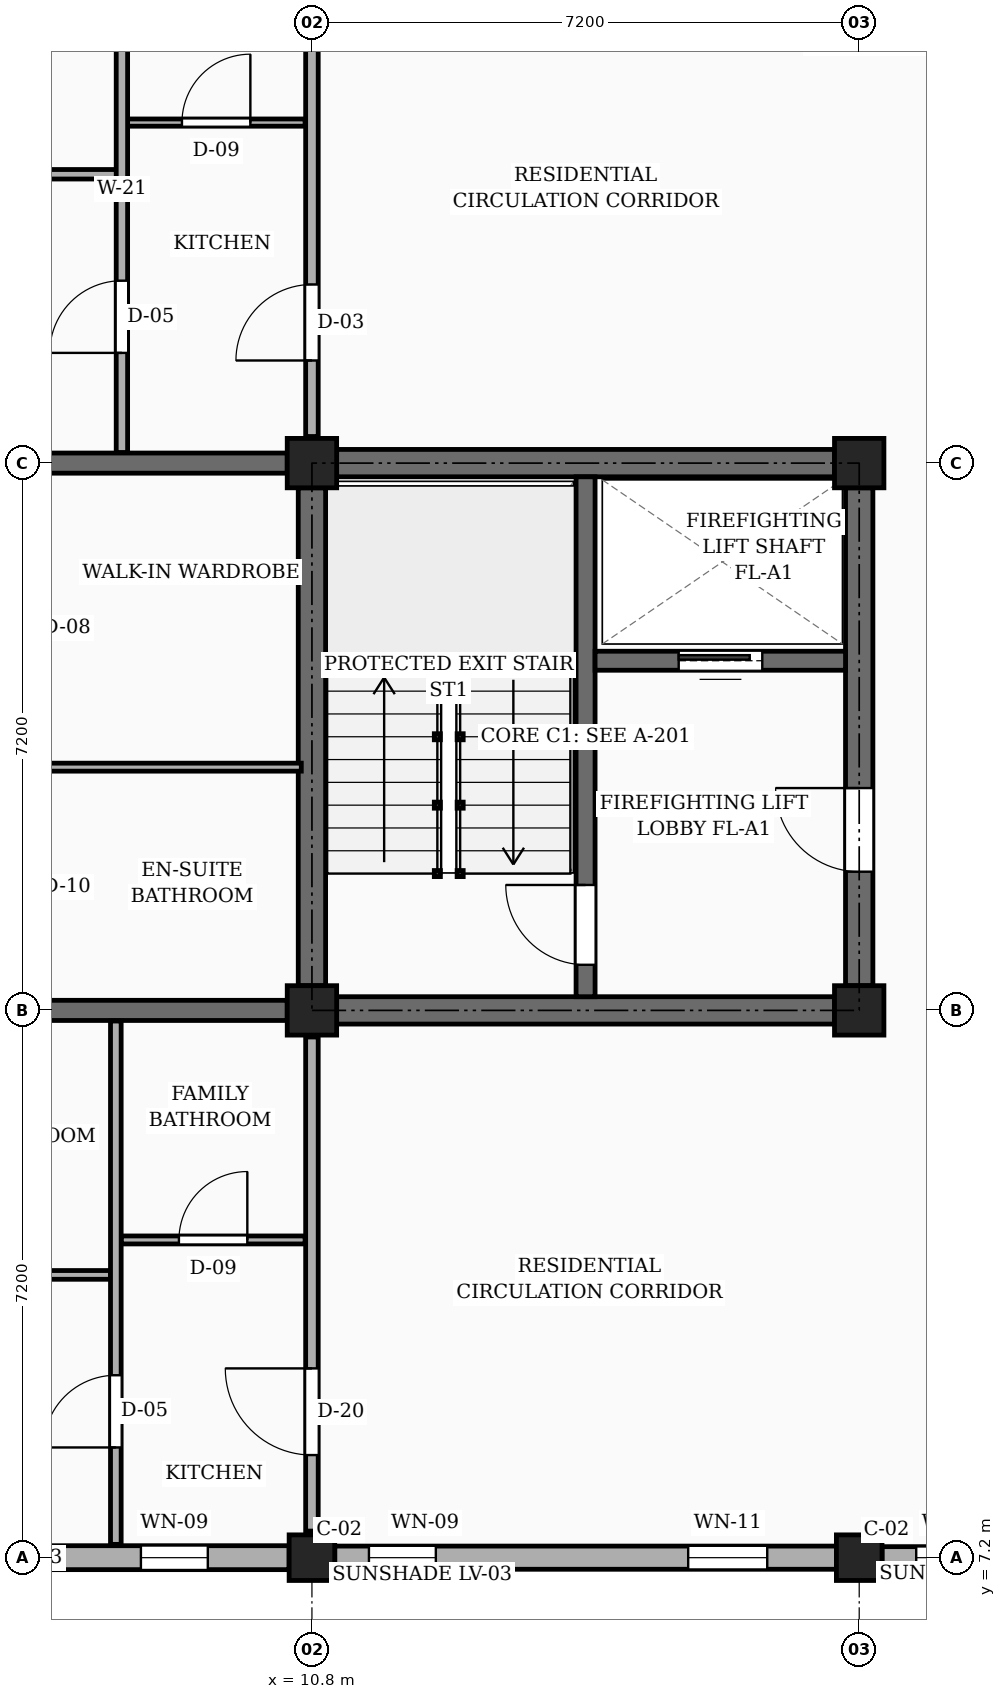
"""IFC4 building model, lengths in metres.
Left out: names, types, materials, properties, quantities, classifications, styles, units other than length and angle.
Written with IfcOpenShell. Run it as: python <this file> out.ifc"""

import sys

from ifc_helpers import new_model, si_unit, direction, frame, frame_2d, origin, origin_2d, place, context, subcontext, project, spatial, rectangle, extrude, element, fill, save


model = new_model("IFC4")
c1 = context("Model", 3, precision=1e-05, world=origin(), true_north=direction((0.0, 1.0)))
c2 = subcontext(c1, "Body", "Model", "MODEL_VIEW")
j1 = project(units=[si_unit("LENGTHUNIT", "METRE"), si_unit("PLANEANGLEUNIT", "RADIAN")], contexts=[c1])
p1 = place(None, origin())
s1 = spatial("IfcSite", under=j1, at=p1, CompositionType="ELEMENT")
p2 = place(p1, origin())
s2 = spatial("IfcBuilding", under=s1, at=p2, CompositionType="ELEMENT")
p3 = place(p2, frame((0.0, 0.0, 4.5)))
s3 = spatial("IfcBuildingStorey", under=s2, at=p3, CompositionType="ELEMENT", Elevation=4.5)
p4 = place(p3, frame((10.8, 7.2, 0.0), z_axis=(0.0, 0.0, 1.0), x_axis=(1.0, 0.0, 0.0)))
e1 = element("IfcColumn", 1, at=p4, inside=s3, PredefinedType="COLUMN", context=c2, shape_type="SweptSolid", body=[
    extrude(rectangle(XDim=0.6, YDim=0.6, at=origin_2d()), origin(), (0.0, 0.0, 1.0), 3.15),
])
for number, where, z_axis, x_axis in (
    (2, (10.8, 14.4, 0.0), (0.0, 0.0, 1.0), (1.0, 0.0, 0.0)),
    (3, (10.8, 21.6, 0.0), (0.0, 0.0, 1.0), (1.0, 0.0, 0.0)),
):
    element("IfcColumn", number, at=place(p3, frame(where, z_axis=z_axis, x_axis=x_axis)), inside=s3, PredefinedType="COLUMN", context=c2, shape_type="SweptSolid", body=[
        extrude(rectangle(XDim=0.65, YDim=0.65, at=origin_2d()), origin(), (0.0, 0.0, 1.0), 3.15),
    ])
p5 = place(p3, frame((18.0, 7.2, 0.0), z_axis=(0.0, 0.0, 1.0), x_axis=(1.0, 0.0, 0.0)))
e4 = element("IfcColumn", 4, at=p5, inside=s3, PredefinedType="COLUMN", context=c2, shape_type="SweptSolid", body=[
    extrude(rectangle(XDim=0.6, YDim=0.6, at=origin_2d()), origin(), (0.0, 0.0, 1.0), 3.15),
])
for number, where, z_axis, x_axis in (
    (5, (18.0, 14.4, 0.0), (0.0, 0.0, 1.0), (1.0, 0.0, 0.0)),
    (6, (18.0, 21.6, 0.0), (0.0, 0.0, 1.0), (1.0, 0.0, 0.0)),
):
    element("IfcColumn", number, at=place(p3, frame(where, z_axis=z_axis, x_axis=x_axis)), inside=s3, PredefinedType="COLUMN", context=c2, shape_type="SweptSolid", body=[
        extrude(rectangle(XDim=0.65, YDim=0.65, at=origin_2d()), origin(), (0.0, 0.0, 1.0), 3.15),
    ])
p6 = place(p3, frame((3.9, 14.4, 0.0), z_axis=(0.0, 0.0, 1.0), x_axis=(1.0, 0.0, 0.0)))
e7 = element("IfcWall", 7, at=p6, inside=s3, PredefinedType="SOLIDWALL", context=c2, shape_type="SweptSolid", body=[
    extrude(rectangle(XDim=6.575, YDim=0.265, at=frame_2d((3.288, 0.0))), origin(), (0.0, 0.0, 1.0), 2.17),
])
p7 = place(p6, frame((1.35, 0.0, 0.0)))
e8 = element("IfcOpeningElement", 8, at=p7, cuts=e7, PredefinedType="OPENING", context=c2, shape_type="SweptSolid", body=[
    extrude(rectangle(XDim=0.98, YDim=2.12, at=frame_2d((0.49, 1.06))), frame((0.0, 0.143, 0.0), z_axis=(0.0, -1.0, 0.0), x_axis=(1.0, 0.0, 0.0)), (0.0, 0.0, 1.0), 0.285),
])
p8 = place(p3, frame((3.9, 21.6, 0.0), z_axis=(0.0, 0.0, 1.0), x_axis=(1.0, 0.0, 0.0)))
e9 = element("IfcWall", 9, at=p8, inside=s3, PredefinedType="SOLIDWALL", context=c2, shape_type="SweptSolid", body=[
    extrude(rectangle(XDim=6.575, YDim=0.265, at=frame_2d((3.288, 0.0))), origin(), (0.0, 0.0, 1.0), 2.17),
])
p9 = place(p3, frame((3.9, 7.2, 0.0), z_axis=(0.0, 0.0, 1.0), x_axis=(1.0, 0.0, 0.0)))
e10 = element("IfcWall", 10, at=p9, inside=s3, PredefinedType="SOLIDWALL", context=c2, shape_type="SweptSolid", body=[
    extrude(rectangle(XDim=6.6, YDim=0.315, at=frame_2d((3.3, 0.0))), origin(), (0.0, 0.0, 1.0), 2.44),
])
p10 = place(p9, frame((0.45, 0.0, 0.78)))
e11 = element("IfcOpeningElement", 11, at=p10, cuts=e10, PredefinedType="OPENING", context=c2, shape_type="SweptSolid", body=[
    extrude(rectangle(XDim=1.32, YDim=1.15, at=frame_2d((0.66, 0.575))), frame((0.0, 0.167, 0.0), z_axis=(0.0, -1.0, 0.0), x_axis=(1.0, 0.0, 0.0)), (0.0, 0.0, 1.0), 0.335),
])
p11 = place(p9, frame((4.65, 0.0, 0.78)))
e12 = element("IfcOpeningElement", 12, at=p11, cuts=e10, PredefinedType="OPENING", context=c2, shape_type="SweptSolid", body=[
    extrude(rectangle(XDim=0.88, YDim=1.26, at=frame_2d((0.44, 0.63))), frame((0.0, 0.167, 0.0), z_axis=(0.0, -1.0, 0.0), x_axis=(1.0, 0.0, 0.0)), (0.0, 0.0, 1.0), 0.335),
])
p12 = place(p3, frame((11.1, 7.2, 0.0), z_axis=(0.0, 0.0, 1.0), x_axis=(1.0, 0.0, 0.0)))
e13 = element("IfcWall", 13, at=p12, inside=s3, PredefinedType="SOLIDWALL", context=c2, shape_type="SweptSolid", body=[
    extrude(rectangle(XDim=6.6, YDim=0.305, at=frame_2d((3.3, 0.0))), origin(), (0.0, 0.0, 1.0), 2.44),
])
p13 = place(p12, frame((0.45, 0.0, 0.78)))
e14 = element("IfcOpeningElement", 14, at=p13, cuts=e13, PredefinedType="OPENING", context=c2, shape_type="SweptSolid", body=[
    extrude(rectangle(XDim=0.88, YDim=1.26, at=frame_2d((0.44, 0.63))), frame((0.0, 0.163, 0.0), z_axis=(0.0, -1.0, 0.0), x_axis=(1.0, 0.0, 0.0)), (0.0, 0.0, 1.0), 0.325),
])
p14 = place(p12, frame((4.65, 0.0, 0.78)))
e15 = element("IfcOpeningElement", 15, at=p14, cuts=e13, PredefinedType="OPENING", context=c2, shape_type="SweptSolid", body=[
    extrude(rectangle(XDim=1.04, YDim=1.26, at=frame_2d((0.52, 0.63))), frame((0.0, 0.163, 0.0), z_axis=(0.0, -1.0, 0.0), x_axis=(1.0, 0.0, 0.0)), (0.0, 0.0, 1.0), 0.325),
])
p15 = place(p3, frame((18.3, 7.2, 0.0), z_axis=(0.0, 0.0, 1.0), x_axis=(1.0, 0.0, 0.0)))
e16 = element("IfcWall", 16, at=p15, inside=s3, PredefinedType="SOLIDWALL", context=c2, shape_type="SweptSolid", body=[
    extrude(rectangle(XDim=6.6, YDim=0.29, at=frame_2d((3.3, 0.0))), origin(), (0.0, 0.0, 1.0), 2.44),
])
p16 = place(p15, frame((0.45, 0.0, 0.78)))
e17 = element("IfcOpeningElement", 17, at=p16, cuts=e16, PredefinedType="OPENING", context=c2, shape_type="SweptSolid", body=[
    extrude(rectangle(XDim=1.04, YDim=1.26, at=frame_2d((0.52, 0.63))), frame((0.0, 0.155, 0.0), z_axis=(0.0, -1.0, 0.0), x_axis=(1.0, 0.0, 0.0)), (0.0, 0.0, 1.0), 0.31),
])
p17 = place(p15, frame((2.675, 0.0, 0.78)))
e18 = element("IfcOpeningElement", 18, at=p17, cuts=e16, PredefinedType="OPENING", context=c2, shape_type="SweptSolid", body=[
    extrude(rectangle(XDim=1.2, YDim=1.26, at=frame_2d((0.6, 0.63))), frame((0.0, 0.155, 0.0), z_axis=(0.0, -1.0, 0.0), x_axis=(1.0, 0.0, 0.0)), (0.0, 0.0, 1.0), 0.31),
])
p18 = place(p15, frame((5.085, 0.0, 0.78)))
e19 = element("IfcOpeningElement", 19, at=p18, cuts=e16, PredefinedType="OPENING", context=c2, shape_type="SweptSolid", body=[
    extrude(rectangle(XDim=1.04, YDim=1.26, at=frame_2d((0.52, 0.63))), frame((0.0, 0.155, 0.0), z_axis=(0.0, -1.0, 0.0), x_axis=(1.0, 0.0, 0.0)), (0.0, 0.0, 1.0), 0.31),
])
p19 = place(p3, frame((10.8, 14.725, 0.0), z_axis=(0.0, 0.0, 1.0), x_axis=(0.0, 1.0, 0.0)))
e20 = element("IfcWall", 20, at=p19, inside=s3, PredefinedType="SHEAR", context=c2, shape_type="SweptSolid", body=[
    extrude(rectangle(XDim=6.55, YDim=0.36, at=frame_2d((3.275, 0.0))), origin(), (0.0, 0.0, 1.0), 2.87),
])
p20 = place(p3, frame((11.125, 21.6, 0.0), z_axis=(0.0, 0.0, 1.0), x_axis=(1.0, 0.0, 0.0)))
e21 = element("IfcWall", 21, at=p20, inside=s3, PredefinedType="SHEAR", context=c2, shape_type="SweptSolid", body=[
    extrude(rectangle(XDim=6.55, YDim=0.36, at=frame_2d((3.275, 0.0))), origin(), (0.0, 0.0, 1.0), 2.87),
])
p21 = place(p3, frame((18.0, 14.725, 0.0), z_axis=(0.0, 0.0, 1.0), x_axis=(0.0, 1.0, 0.0)))
e22 = element("IfcWall", 22, at=p21, inside=s3, PredefinedType="SHEAR", context=c2, shape_type="SweptSolid", body=[
    extrude(rectangle(XDim=6.55, YDim=0.36, at=frame_2d((3.275, 0.0))), origin(), (0.0, 0.0, 1.0), 2.87),
])
p22 = place(p21, frame((1.5, 0.0, 0.0)))
e23 = element("IfcOpeningElement", 23, at=p22, cuts=e22, PredefinedType="OPENING", context=c2, shape_type="SweptSolid", body=[
    extrude(rectangle(XDim=1.1, YDim=2.15, at=frame_2d((0.55, 1.075))), frame((0.0, 0.19, 0.0), z_axis=(0.0, -1.0, 0.0), x_axis=(1.0, 0.0, 0.0)), (0.0, 0.0, 1.0), 0.38),
])
p23 = place(p3, frame((11.125, 14.4, 0.0), z_axis=(0.0, 0.0, 1.0), x_axis=(1.0, 0.0, 0.0)))
e24 = element("IfcWall", 24, at=p23, inside=s3, PredefinedType="SHEAR", context=c2, shape_type="SweptSolid", body=[
    extrude(rectangle(XDim=6.55, YDim=0.36, at=frame_2d((3.275, 0.0))), origin(), (0.0, 0.0, 1.0), 2.87),
])
p24 = place(p3, frame((14.4, 14.58, 0.0), z_axis=(0.0, 0.0, 1.0), x_axis=(0.0, 1.0, 0.0)))
e25 = element("IfcWall", 25, at=p24, inside=s3, PredefinedType="SHEAR", context=c2, shape_type="SweptSolid", body=[
    extrude(rectangle(XDim=6.84, YDim=0.25, at=frame_2d((3.42, 0.0))), origin(), (0.0, 0.0, 1.0), 2.87),
])
p25 = place(p24, frame((0.42, 0.0, 0.0)))
e26 = element("IfcOpeningElement", 26, at=p25, cuts=e25, PredefinedType="OPENING", context=c2, shape_type="SweptSolid", body=[
    extrude(rectangle(XDim=1.05, YDim=2.15, at=frame_2d((0.525, 1.075))), frame((0.0, 0.135, 0.0), z_axis=(0.0, -1.0, 0.0), x_axis=(1.0, 0.0, 0.0)), (0.0, 0.0, 1.0), 0.27),
])
p26 = place(p3, frame((14.525, 19.0, 0.0), z_axis=(0.0, 0.0, 1.0), x_axis=(1.0, 0.0, 0.0)))
e27 = element("IfcWall", 27, at=p26, inside=s3, PredefinedType="SHEAR", context=c2, shape_type="SweptSolid", body=[
    extrude(rectangle(XDim=3.295, YDim=0.25, at=frame_2d((1.647, 0.0))), origin(), (0.0, 0.0, 1.0), 2.87),
])
p27 = place(p26, frame((1.1, 0.0, 0.0)))
e28 = element("IfcOpeningElement", 28, at=p27, cuts=e27, PredefinedType="OPENING", context=c2, shape_type="SweptSolid", body=[
    extrude(rectangle(XDim=1.1, YDim=2.2, at=frame_2d((0.55, 1.1))), frame((0.0, 0.135, 0.0), z_axis=(0.0, -1.0, 0.0), x_axis=(1.0, 0.0, 0.0)), (0.0, 0.0, 1.0), 0.27),
])
p28 = place(p3, frame((10.8, 7.55, 0.0), z_axis=(0.0, 0.0, 1.0), x_axis=(0.0, 1.0, 0.0)))
e29 = element("IfcWall", 29, at=p28, inside=s3, PredefinedType="PARTITIONING", context=c2, shape_type="SweptSolid", body=[
    extrude(rectangle(XDim=6.5, YDim=0.165, at=frame_2d((3.25, 0.0))), origin(), (0.0, 0.0, 1.0), 2.22),
])
p29 = place(p28, frame((1.0, 0.0, 0.0)))
e30 = element("IfcOpeningElement", 30, at=p29, cuts=e29, PredefinedType="OPENING", context=c2, shape_type="SweptSolid", body=[
    extrude(rectangle(XDim=1.14, YDim=2.18, at=frame_2d((0.57, 1.09))), frame((0.0, 0.093, 0.0), z_axis=(0.0, -1.0, 0.0), x_axis=(1.0, 0.0, 0.0)), (0.0, 0.0, 1.0), 0.185),
])
p30 = place(p3, frame((10.8, 21.95, 0.0), z_axis=(0.0, 0.0, 1.0), x_axis=(0.0, 1.0, 0.0)))
e31 = element("IfcWall", 31, at=p30, inside=s3, PredefinedType="PARTITIONING", context=c2, shape_type="SweptSolid", body=[
    extrude(rectangle(XDim=6.5, YDim=0.165, at=frame_2d((3.25, 0.0))), origin(), (0.0, 0.0, 1.0), 2.22),
])
p31 = place(p30, frame((1.0, 0.0, 0.0)))
e32 = element("IfcOpeningElement", 32, at=p31, cuts=e31, PredefinedType="OPENING", context=c2, shape_type="SweptSolid", body=[
    extrude(rectangle(XDim=1.0, YDim=2.15, at=frame_2d((0.5, 1.075))), frame((0.0, 0.093, 0.0), z_axis=(0.0, -1.0, 0.0), x_axis=(1.0, 0.0, 0.0)), (0.0, 0.0, 1.0), 0.185),
])
p32 = place(p3, frame((3.775, 10.92, 0.0), z_axis=(0.0, 0.0, 1.0), x_axis=(1.0, 0.0, 0.0)))
e33 = element("IfcWall", 33, at=p32, inside=s3, PredefinedType="PARTITIONING", context=c2, shape_type="SweptSolid", body=[
    extrude(rectangle(XDim=4.375, YDim=0.115, at=frame_2d((2.188, 0.0))), origin(), (0.0, 0.0, 1.0), 2.305),
])
p33 = place(p32, frame((1.738, 0.0, 0.0)))
e34 = element("IfcOpeningElement", 34, at=p33, cuts=e33, PredefinedType="OPENING", context=c2, shape_type="SweptSolid", body=[
    extrude(rectangle(XDim=0.9, YDim=2.1, at=frame_2d((0.45, 1.05))), frame((0.0, 0.067, 0.0), z_axis=(0.0, -1.0, 0.0), x_axis=(1.0, 0.0, 0.0)), (0.0, 0.0, 1.0), 0.135),
])
p34 = place(p3, frame((8.29, 11.38, 0.0), z_axis=(0.0, 0.0, 1.0), x_axis=(1.0, 0.0, 0.0)))
e35 = element("IfcWall", 35, at=p34, inside=s3, PredefinedType="PARTITIONING", context=c2, shape_type="SweptSolid", body=[
    extrude(rectangle(XDim=2.42, YDim=0.105, at=frame_2d((1.21, 0.0))), origin(), (0.0, 0.0, 1.0), 2.305),
])
p35 = place(p34, frame((0.76, 0.0, 0.0)))
e36 = element("IfcOpeningElement", 36, at=p35, cuts=e35, PredefinedType="OPENING", context=c2, shape_type="SweptSolid", body=[
    extrude(rectangle(XDim=0.9, YDim=2.05, at=frame_2d((0.45, 1.025))), frame((0.0, 0.062, 0.0), z_axis=(0.0, -1.0, 0.0), x_axis=(1.0, 0.0, 0.0)), (0.0, 0.0, 1.0), 0.125),
])
p36 = place(p3, frame((8.22, 7.375, 0.0), z_axis=(0.0, 0.0, 1.0), x_axis=(0.0, 1.0, 0.0)))
e37 = element("IfcWall", 37, at=p36, inside=s3, PredefinedType="PARTITIONING", context=c2, shape_type="SweptSolid", body=[
    extrude(rectangle(XDim=6.885, YDim=0.14, at=frame_2d((3.442, 0.0))), origin(), (0.0, 0.0, 1.0), 2.305),
])
p37 = place(p36, frame((1.275, 0.0, 0.0)))
e38 = element("IfcOpeningElement", 38, at=p37, cuts=e37, PredefinedType="OPENING", context=c2, shape_type="SweptSolid", body=[
    extrude(rectangle(XDim=0.95, YDim=2.1, at=frame_2d((0.475, 1.05))), frame((0.0, 0.08, 0.0), z_axis=(0.0, -1.0, 0.0), x_axis=(1.0, 0.0, 0.0)), (0.0, 0.0, 1.0), 0.16),
])
p38 = place(p3, frame((7.27, 17.6, 0.0), z_axis=(0.0, 0.0, 1.0), x_axis=(1.0, 0.0, 0.0)))
e39 = element("IfcWall", 39, at=p38, inside=s3, PredefinedType="PARTITIONING", context=c2, shape_type="SweptSolid", body=[
    extrude(rectangle(XDim=3.39, YDim=0.105, at=frame_2d((1.695, 0.0))), origin(), (0.0, 0.0, 1.0), 2.305),
])
p39 = place(p3, frame((3.775, 25.4, 0.0), z_axis=(0.0, 0.0, 1.0), x_axis=(1.0, 0.0, 0.0)))
e40 = element("IfcWall", 40, at=p39, inside=s3, PredefinedType="PARTITIONING", context=c2, shape_type="SweptSolid", body=[
    extrude(rectangle(XDim=4.455, YDim=0.125, at=frame_2d((2.228, 0.0))), origin(), (0.0, 0.0, 1.0), 2.305),
])
p40 = place(p39, frame((1.778, 0.0, 0.0)))
e41 = element("IfcOpeningElement", 41, at=p40, cuts=e40, PredefinedType="OPENING", context=c2, shape_type="SweptSolid", body=[
    extrude(rectangle(XDim=0.9, YDim=2.1, at=frame_2d((0.45, 1.05))), frame((0.0, 0.073, 0.0), z_axis=(0.0, -1.0, 0.0), x_axis=(1.0, 0.0, 0.0)), (0.0, 0.0, 1.0), 0.145),
])
p41 = place(p3, frame((8.37, 26.08, 0.0), z_axis=(0.0, 0.0, 1.0), x_axis=(1.0, 0.0, 0.0)))
e42 = element("IfcWall", 42, at=p41, inside=s3, PredefinedType="PARTITIONING", context=c2, shape_type="SweptSolid", body=[
    extrude(rectangle(XDim=2.34, YDim=0.095, at=frame_2d((1.17, 0.0))), origin(), (0.0, 0.0, 1.0), 2.305),
])
p42 = place(p41, frame((0.72, 0.0, 0.0)))
e43 = element("IfcOpeningElement", 43, at=p42, cuts=e42, PredefinedType="OPENING", context=c2, shape_type="SweptSolid", body=[
    extrude(rectangle(XDim=0.9, YDim=2.05, at=frame_2d((0.45, 1.025))), frame((0.0, 0.058, 0.0), z_axis=(0.0, -1.0, 0.0), x_axis=(1.0, 0.0, 0.0)), (0.0, 0.0, 1.0), 0.115),
])
p43 = place(p3, frame((8.3, 21.74, 0.0), z_axis=(0.0, 0.0, 1.0), x_axis=(0.0, 1.0, 0.0)))
e44 = element("IfcWall", 44, at=p43, inside=s3, PredefinedType="PARTITIONING", context=c2, shape_type="SweptSolid", body=[
    extrude(rectangle(XDim=6.92, YDim=0.15, at=frame_2d((3.46, 0.0))), origin(), (0.0, 0.0, 1.0), 2.305),
])
p44 = place(p43, frame((1.31, 0.0, 0.0)))
e45 = element("IfcOpeningElement", 45, at=p44, cuts=e44, PredefinedType="OPENING", context=c2, shape_type="SweptSolid", body=[
    extrude(rectangle(XDim=0.95, YDim=2.1, at=frame_2d((0.475, 1.05))), frame((0.0, 0.085, 0.0), z_axis=(0.0, -1.0, 0.0), x_axis=(1.0, 0.0, 0.0)), (0.0, 0.0, 1.0), 0.17),
])
p45 = place(p11, origin())
e46 = element("IfcWindow", 46, at=p45, inside=s3, PartitioningType="SINGLE_PANEL", PredefinedType="WINDOW", context=c2, shape_type="SweptSolid", body=[
    extrude(rectangle(XDim=0.88, YDim=1.26, at=frame_2d((0.44, 0.63))), frame((0.0, 0.03, 0.0), z_axis=(0.0, -1.0, 0.0), x_axis=(1.0, 0.0, 0.0)), (0.0, 0.0, 1.0), 0.06),
])
fill(e12, e46)
p46 = place(p13, origin())
e47 = element("IfcWindow", 47, at=p46, inside=s3, PartitioningType="SINGLE_PANEL", PredefinedType="WINDOW", context=c2, shape_type="SweptSolid", body=[
    extrude(rectangle(XDim=0.88, YDim=1.26, at=frame_2d((0.44, 0.63))), frame((0.0, 0.03, 0.0), z_axis=(0.0, -1.0, 0.0), x_axis=(1.0, 0.0, 0.0)), (0.0, 0.0, 1.0), 0.06),
])
fill(e14, e47)
p47 = place(p14, origin())
e48 = element("IfcWindow", 48, at=p47, inside=s3, PartitioningType="SINGLE_PANEL", PredefinedType="WINDOW", context=c2, shape_type="SweptSolid", body=[
    extrude(rectangle(XDim=1.04, YDim=1.26, at=frame_2d((0.52, 0.63))), frame((0.0, 0.03, 0.0), z_axis=(0.0, -1.0, 0.0), x_axis=(1.0, 0.0, 0.0)), (0.0, 0.0, 1.0), 0.06),
])
fill(e15, e48)
p48 = place(p16, origin())
e49 = element("IfcWindow", 49, at=p48, inside=s3, PartitioningType="SINGLE_PANEL", PredefinedType="WINDOW", context=c2, shape_type="SweptSolid", body=[
    extrude(rectangle(XDim=1.04, YDim=1.26, at=frame_2d((0.52, 0.63))), frame((0.0, 0.03, 0.0), z_axis=(0.0, -1.0, 0.0), x_axis=(1.0, 0.0, 0.0)), (0.0, 0.0, 1.0), 0.06),
])
fill(e17, e49)
p49 = place(p22, frame((1.1, 0.0, 0.0), z_axis=(0.0, 0.0, 1.0), x_axis=(-1.0, 0.0, 0.0)))
e50 = element("IfcDoor", 50, at=p49, inside=s3, OperationType="SINGLE_SWING_RIGHT", PredefinedType="DOOR", context=c2, shape_type="SweptSolid", body=[
    extrude(rectangle(XDim=1.1, YDim=2.15, at=frame_2d((0.55, 1.075))), frame((0.0, 0.025, 0.0), z_axis=(0.0, -1.0, 0.0), x_axis=(1.0, 0.0, 0.0)), (0.0, 0.0, 1.0), 0.05),
])
fill(e23, e50)
p50 = place(p25, origin())
e51 = element("IfcDoor", 51, at=p50, inside=s3, OperationType="SINGLE_SWING_RIGHT", PredefinedType="DOOR", context=c2, shape_type="SweptSolid", body=[
    extrude(rectangle(XDim=1.05, YDim=2.15, at=frame_2d((0.525, 1.075))), frame((0.0, 0.025, 0.0), z_axis=(0.0, -1.0, 0.0), x_axis=(1.0, 0.0, 0.0)), (0.0, 0.0, 1.0), 0.05),
])
fill(e26, e51)
p51 = place(p27, origin())
e52 = element("IfcDoor", 52, at=p51, inside=s3, OperationType="SLIDING_TO_LEFT", PredefinedType="DOOR", context=c2, shape_type="SweptSolid", body=[
    extrude(rectangle(XDim=1.1, YDim=2.2, at=frame_2d((0.55, 1.1))), frame((0.0, 0.025, 0.0), z_axis=(0.0, -1.0, 0.0), x_axis=(1.0, 0.0, 0.0)), (0.0, 0.0, 1.0), 0.05),
])
fill(e28, e52)
p52 = place(p29, origin())
e53 = element("IfcDoor", 53, at=p52, inside=s3, OperationType="SINGLE_SWING_RIGHT", PredefinedType="DOOR", context=c2, shape_type="SweptSolid", body=[
    extrude(rectangle(XDim=1.14, YDim=2.18, at=frame_2d((0.57, 1.09))), frame((0.0, 0.025, 0.0), z_axis=(0.0, -1.0, 0.0), x_axis=(1.0, 0.0, 0.0)), (0.0, 0.0, 1.0), 0.05),
])
fill(e30, e53)
p53 = place(p31, origin())
e54 = element("IfcDoor", 54, at=p53, inside=s3, OperationType="SINGLE_SWING_LEFT", PredefinedType="DOOR", context=c2, shape_type="SweptSolid", body=[
    extrude(rectangle(XDim=1.0, YDim=2.15, at=frame_2d((0.5, 1.075))), frame((0.0, 0.025, 0.0), z_axis=(0.0, -1.0, 0.0), x_axis=(1.0, 0.0, 0.0)), (0.0, 0.0, 1.0), 0.05),
])
fill(e32, e54)
p54 = place(p35, origin())
e55 = element("IfcDoor", 55, at=p54, inside=s3, OperationType="SINGLE_SWING_RIGHT", PredefinedType="DOOR", context=c2, shape_type="SweptSolid", body=[
    extrude(rectangle(XDim=0.9, YDim=2.05, at=frame_2d((0.45, 1.025))), frame((0.0, 0.025, 0.0), z_axis=(0.0, -1.0, 0.0), x_axis=(1.0, 0.0, 0.0)), (0.0, 0.0, 1.0), 0.05),
])
fill(e36, e55)
p55 = place(p37, origin())
e56 = element("IfcDoor", 56, at=p55, inside=s3, OperationType="SINGLE_SWING_LEFT", PredefinedType="DOOR", context=c2, shape_type="SweptSolid", body=[
    extrude(rectangle(XDim=0.95, YDim=2.1, at=frame_2d((0.475, 1.05))), frame((0.0, 0.025, 0.0), z_axis=(0.0, -1.0, 0.0), x_axis=(1.0, 0.0, 0.0)), (0.0, 0.0, 1.0), 0.05),
])
fill(e38, e56)
p56 = place(p42, origin())
e57 = element("IfcDoor", 57, at=p56, inside=s3, OperationType="SINGLE_SWING_RIGHT", PredefinedType="DOOR", context=c2, shape_type="SweptSolid", body=[
    extrude(rectangle(XDim=0.9, YDim=2.05, at=frame_2d((0.45, 1.025))), frame((0.0, 0.025, 0.0), z_axis=(0.0, -1.0, 0.0), x_axis=(1.0, 0.0, 0.0)), (0.0, 0.0, 1.0), 0.05),
])
fill(e43, e57)
p57 = place(p44, origin())
e58 = element("IfcDoor", 58, at=p57, inside=s3, OperationType="SINGLE_SWING_LEFT", PredefinedType="DOOR", context=c2, shape_type="SweptSolid", body=[
    extrude(rectangle(XDim=0.95, YDim=2.1, at=frame_2d((0.475, 1.05))), frame((0.0, 0.025, 0.0), z_axis=(0.0, -1.0, 0.0), x_axis=(1.0, 0.0, 0.0)), (0.0, 0.0, 1.0), 0.05),
])
fill(e45, e58)
save(model, sys.argv[1])
